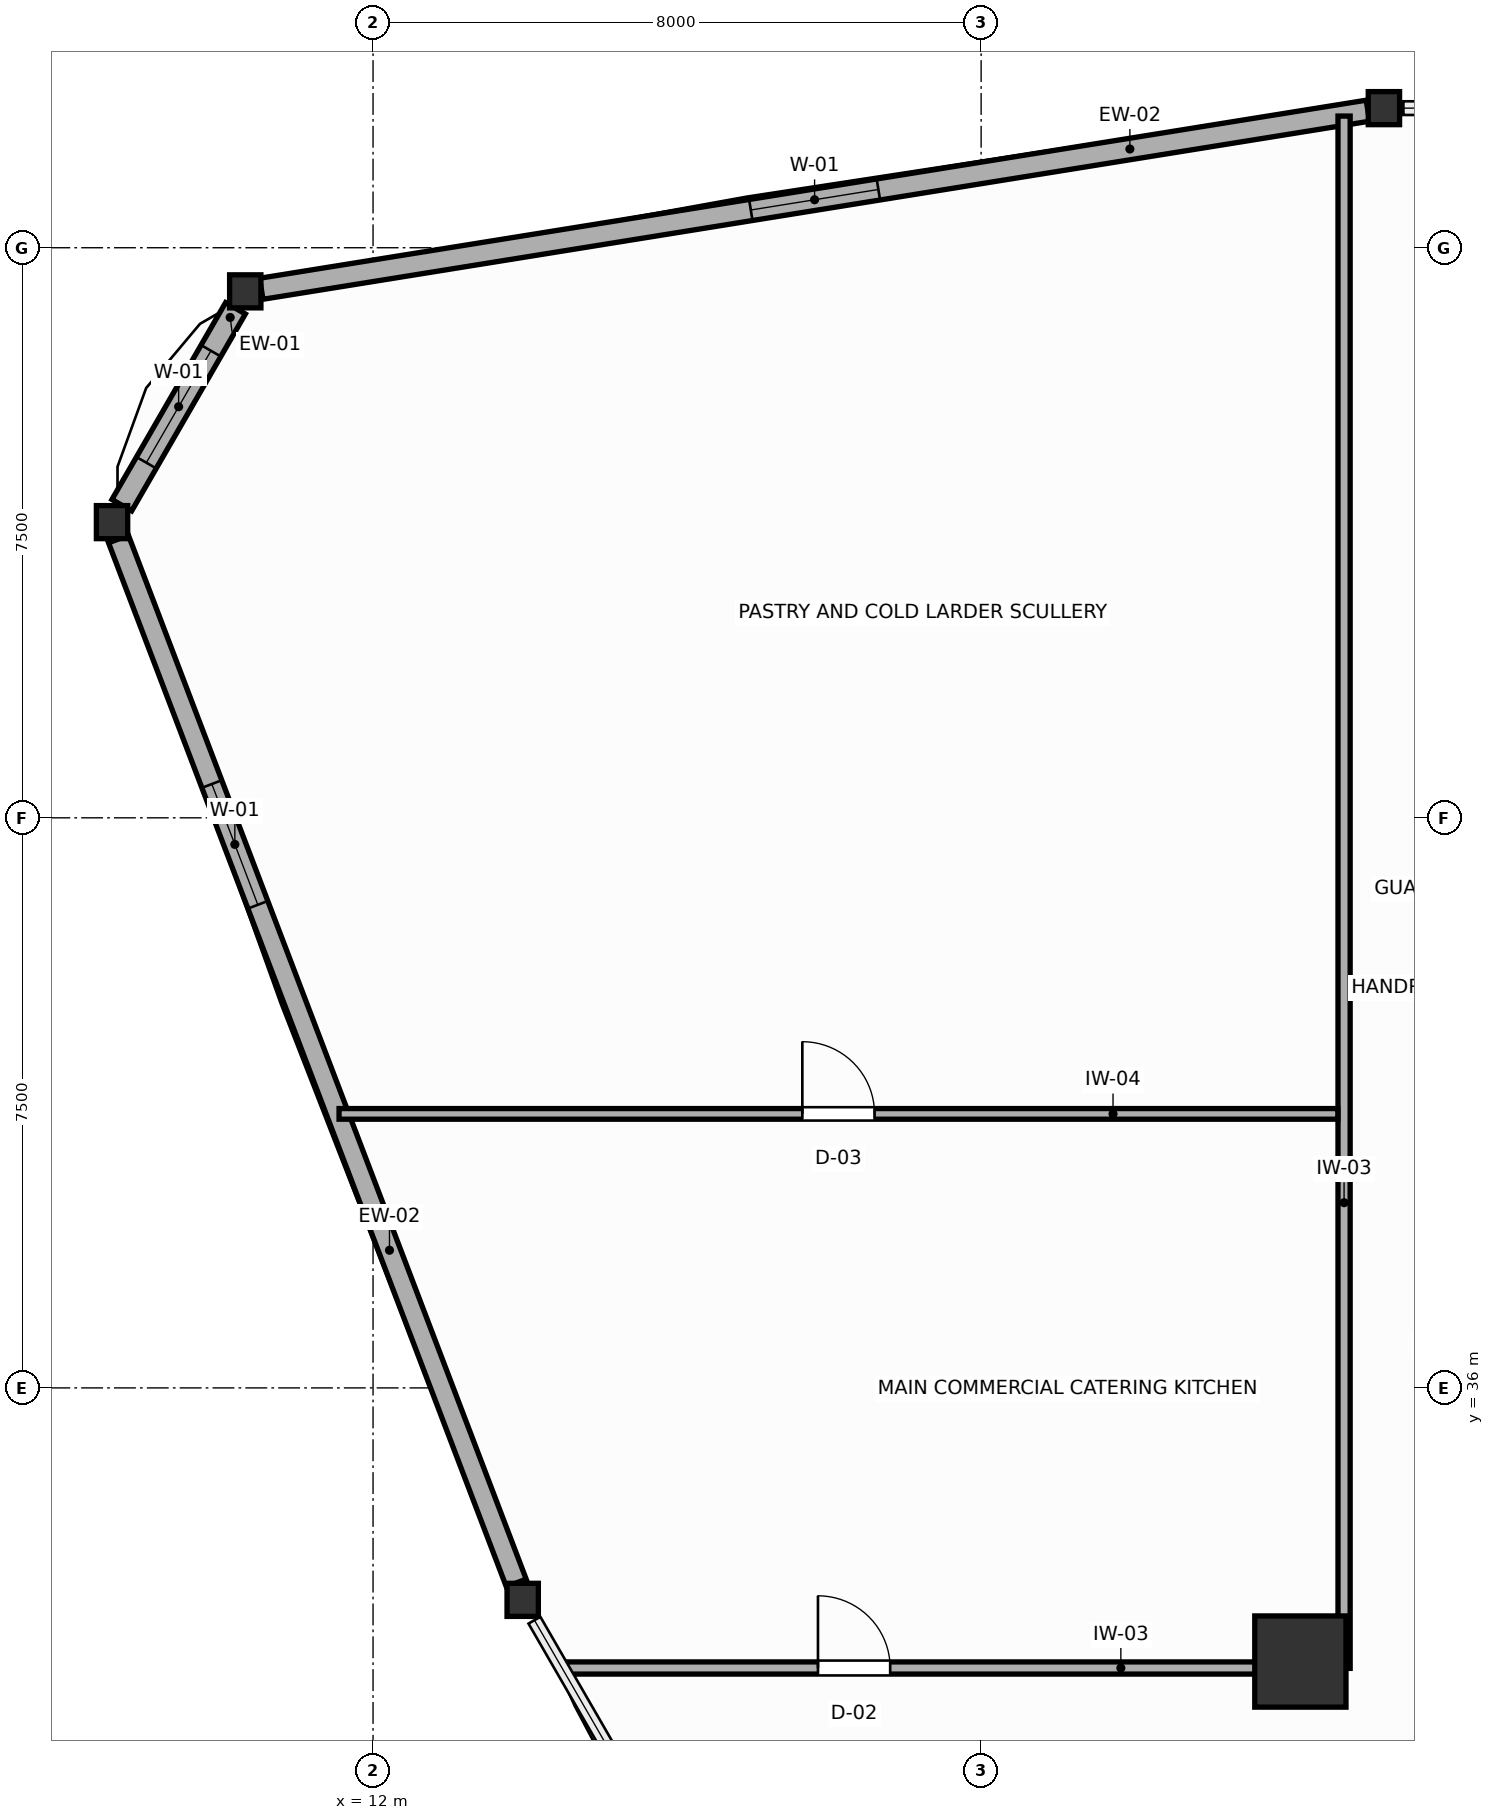
"""IFC4 building model, lengths in metres.
Left out: names, types, materials, properties, quantities, classifications, styles, units other than length and angle.
Written with IfcOpenShell. Run it as: python <this file> out.ifc"""

import sys

from ifc_helpers import new_model, si_unit, direction, frame, frame_2d, origin, origin_2d, place, context, subcontext, project, spatial, rectangle, i_section, extrude, source, transform, mapped, element, fill, save


model = new_model("IFC4")
c1 = context("Model", 3, precision=1e-05, world=origin(), true_north=direction((0.0, 1.0)))
c2 = subcontext(c1, "Body", "Model", "MODEL_VIEW")
j1 = project(units=[si_unit("LENGTHUNIT", "METRE"), si_unit("PLANEANGLEUNIT", "RADIAN")], contexts=[c1])
p1 = place(None, origin())
s1 = spatial("IfcSite", under=j1, at=p1, CompositionType="ELEMENT")
p2 = place(p1, origin())
s2 = spatial("IfcBuilding", under=s1, at=p2, CompositionType="ELEMENT")
p3 = place(p2, frame((0.0, 0.0, 147.0)))
s3 = spatial("IfcBuildingStorey", under=s2, at=p3, CompositionType="ELEMENT", Elevation=147.0)
m1 = source(origin(), c2, "Body", "SweptSolid", [
    extrude(rectangle(XDim=1.2, YDim=1.2, at=origin_2d()), origin(), (0.0, 0.0, 1.0), 3.6),
])
p4 = place(p3, frame((24.2, 32.4, 0.0), z_axis=(0.0, 0.0, 1.0), x_axis=(1.0, 0.0, 0.0)))
e1 = element("IfcColumn", 1, at=p4, inside=s3, PredefinedType="COLUMN", context=c2, shape_type="MappedRepresentation", body=[
    mapped(m1, transform((0.0, 0.0, 0.0), scale=1.0)),
])
m2 = source(origin(), c2, "Body", "SweptSolid", [
    extrude(i_section(OverallWidth=0.412, OverallDepth=0.435, WebThickness=0.033, FlangeThickness=0.053, FilletRadius=0.015, at=origin_2d()), origin(), (0.0, 0.0, 1.0), 3.6),
])
for number, where, z_axis, x_axis in (
    (2, (25.299, 52.836, 0.0), (0.0, 0.0, 1.0), (1.0, 0.0, 0.0)),
    (3, (10.319, 50.426, 0.0), (0.0, 0.0, 1.0), (1.0, 0.0, 0.0)),
    (4, (8.566, 47.39, 0.0), (0.0, 0.0, 1.0), (1.0, 0.0, 0.0)),
    (5, (13.969, 33.212, 0.0), (0.0, 0.0, 1.0), (1.0, 0.0, 0.0)),
):
    element("IfcColumn", number, at=place(p3, frame(where, z_axis=z_axis, x_axis=x_axis)), inside=s3, PredefinedType="COLUMN", context=c2, shape_type="MappedRepresentation", body=[
        mapped(m2, transform((0.0, 0.0, 0.0), scale=1.0)),
    ])
p5 = place(p3, frame((25.088, 52.802, 0.0), z_axis=(0.0, 0.0, 1.0), x_axis=(-0.987303259595, -0.158846698404, 0.0)))
e6 = element("IfcWall", 6, at=p5, inside=s3, PredefinedType="SOLIDWALL", context=c2, shape_type="SweptSolid", body=[
    extrude(rectangle(XDim=14.746, YDim=0.28, at=frame_2d((7.373, 0.0))), origin(), (0.0, 0.0, 1.0), 2.95),
])
p6 = place(p5, frame((6.523, 0.0, 0.75)))
e7 = element("IfcOpeningElement", 7, at=p6, cuts=e6, PredefinedType="OPENING", context=c2, shape_type="SweptSolid", body=[
    extrude(rectangle(XDim=1.7, YDim=1.75, at=frame_2d((0.85, 0.875))), frame((0.0, 0.15, 0.0), z_axis=(0.0, -1.0, 0.0), x_axis=(1.0, 0.0, 0.0)), (0.0, 0.0, 1.0), 0.3),
])
p7 = place(p3, frame((10.19, 50.204, 0.0), z_axis=(0.0, 0.0, 1.0), x_axis=(-0.499974392705, -0.866040187658, 0.0)))
e8 = element("IfcWall", 8, at=p7, inside=s3, PredefinedType="SOLIDWALL", context=c2, shape_type="SweptSolid", body=[
    extrude(rectangle(XDim=2.992, YDim=0.3, at=frame_2d((1.496, 0.0))), origin(), (0.0, 0.0, 1.0), 3.0),
])
p8 = place(p7, frame((0.646, 0.0, 0.75)))
e9 = element("IfcOpeningElement", 9, at=p8, cuts=e8, PredefinedType="OPENING", context=c2, shape_type="SweptSolid", body=[
    extrude(rectangle(XDim=1.7, YDim=1.75, at=frame_2d((0.85, 0.875))), frame((0.0, 0.16, 0.0), z_axis=(0.0, -1.0, 0.0), x_axis=(1.0, 0.0, 0.0)), (0.0, 0.0, 1.0), 0.32),
])
p9 = place(p3, frame((8.651, 47.167, 0.0), z_axis=(0.0, 0.0, 1.0), x_axis=(0.356077530784, -0.934456415287, 0.0)))
e10 = element("IfcWall", 10, at=p9, inside=s3, PredefinedType="SOLIDWALL", context=c2, shape_type="SweptSolid", body=[
    extrude(rectangle(XDim=14.697, YDim=0.28, at=frame_2d((7.348, 0.0))), origin(), (0.0, 0.0, 1.0), 2.95),
])
p10 = place(p9, frame((3.449, 0.0, 0.75)))
e11 = element("IfcOpeningElement", 11, at=p10, cuts=e10, PredefinedType="OPENING", context=c2, shape_type="SweptSolid", body=[
    extrude(rectangle(XDim=1.7, YDim=1.75, at=frame_2d((0.85, 0.875))), frame((0.0, 0.15, 0.0), z_axis=(0.0, -1.0, 0.0), x_axis=(1.0, 0.0, 0.0)), (0.0, 0.0, 1.0), 0.3),
])
p11 = place(p3, frame((24.775, 32.31, 0.0), z_axis=(0.0, 0.0, 1.0), x_axis=(0.0, 1.0, 0.0)))
e12 = element("IfcWall", 12, at=p11, inside=s3, PredefinedType="PARTITIONING", context=c2, shape_type="SweptSolid", body=[
    extrude(rectangle(XDim=20.422, YDim=0.16, at=frame_2d((10.211, 0.0))), origin(), (0.0, 0.0, 1.0), 3.4),
])
p12 = place(p3, frame((14.507, 32.315, 0.0), z_axis=(0.0, 0.0, 1.0), x_axis=(1.0, 0.0, 0.0)))
e13 = element("IfcWall", 13, at=p12, inside=s3, PredefinedType="PARTITIONING", context=c2, shape_type="SweptSolid", body=[
    extrude(rectangle(XDim=10.187, YDim=0.16, at=frame_2d((5.093, 0.0))), origin(), (0.0, 0.0, 1.0), 2.95),
])
p13 = place(p12, frame((3.347, 0.0, 0.0)))
e14 = element("IfcOpeningElement", 14, at=p13, cuts=e13, PredefinedType="OPENING", context=c2, shape_type="SweptSolid", body=[
    extrude(rectangle(XDim=0.95, YDim=2.05, at=frame_2d((0.475, 1.025))), frame((0.0, 0.09, 0.0), z_axis=(0.0, -1.0, 0.0), x_axis=(1.0, 0.0, 0.0)), (0.0, 0.0, 1.0), 0.18),
])
p14 = place(p3, frame((11.552, 39.605, 0.0), z_axis=(0.0, 0.0, 1.0), x_axis=(1.0, 0.0, 0.0)))
e15 = element("IfcWall", 15, at=p14, inside=s3, PredefinedType="PARTITIONING", context=c2, shape_type="SweptSolid", body=[
    extrude(rectangle(XDim=13.141, YDim=0.14, at=frame_2d((6.57, 0.0))), origin(), (0.0, 0.0, 1.0), 3.4),
])
p15 = place(p14, frame((6.095, 0.0, 0.0)))
e16 = element("IfcOpeningElement", 16, at=p15, cuts=e15, PredefinedType="OPENING", context=c2, shape_type="SweptSolid", body=[
    extrude(rectangle(XDim=0.95, YDim=2.05, at=frame_2d((0.475, 1.025))), frame((0.0, 0.08, 0.0), z_axis=(0.0, -1.0, 0.0), x_axis=(1.0, 0.0, 0.0)), (0.0, 0.0, 1.0), 0.16),
])
p16 = place(p6, origin())
e17 = element("IfcWindow", 17, at=p16, inside=s3, PartitioningType="SINGLE_PANEL", PredefinedType="WINDOW", context=c2, shape_type="SweptSolid", body=[
    extrude(rectangle(XDim=1.7, YDim=1.75, at=frame_2d((0.85, 0.875))), frame((0.0, 0.03, 0.0), z_axis=(0.0, -1.0, 0.0), x_axis=(1.0, 0.0, 0.0)), (0.0, 0.0, 1.0), 0.06),
])
fill(e7, e17)
p17 = place(p8, origin())
e18 = element("IfcWindow", 18, at=p17, inside=s3, PartitioningType="SINGLE_PANEL", PredefinedType="WINDOW", context=c2, shape_type="SweptSolid", body=[
    extrude(rectangle(XDim=1.7, YDim=1.75, at=frame_2d((0.85, 0.875))), frame((0.0, 0.03, 0.0), z_axis=(0.0, -1.0, 0.0), x_axis=(1.0, 0.0, 0.0)), (0.0, 0.0, 1.0), 0.06),
])
fill(e9, e18)
p18 = place(p10, origin())
e19 = element("IfcWindow", 19, at=p18, inside=s3, PartitioningType="SINGLE_PANEL", PredefinedType="WINDOW", context=c2, shape_type="SweptSolid", body=[
    extrude(rectangle(XDim=1.7, YDim=1.75, at=frame_2d((0.85, 0.875))), frame((0.0, 0.03, 0.0), z_axis=(0.0, -1.0, 0.0), x_axis=(1.0, 0.0, 0.0)), (0.0, 0.0, 1.0), 0.06),
])
fill(e11, e19)
p19 = place(p13, origin())
e20 = element("IfcDoor", 20, at=p19, inside=s3, OperationType="SINGLE_SWING_LEFT", PredefinedType="DOOR", context=c2, shape_type="SweptSolid", body=[
    extrude(rectangle(XDim=0.95, YDim=2.05, at=frame_2d((0.475, 1.025))), frame((0.0, 0.025, 0.0), z_axis=(0.0, -1.0, 0.0), x_axis=(1.0, 0.0, 0.0)), (0.0, 0.0, 1.0), 0.05),
])
fill(e14, e20)
p20 = place(p15, origin())
e21 = element("IfcDoor", 21, at=p20, inside=s3, OperationType="SINGLE_SWING_LEFT", PredefinedType="DOOR", context=c2, shape_type="SweptSolid", body=[
    extrude(rectangle(XDim=0.95, YDim=2.05, at=frame_2d((0.475, 1.025))), frame((0.0, 0.025, 0.0), z_axis=(0.0, -1.0, 0.0), x_axis=(1.0, 0.0, 0.0)), (0.0, 0.0, 1.0), 0.05),
])
fill(e16, e21)
save(model, sys.argv[1])
